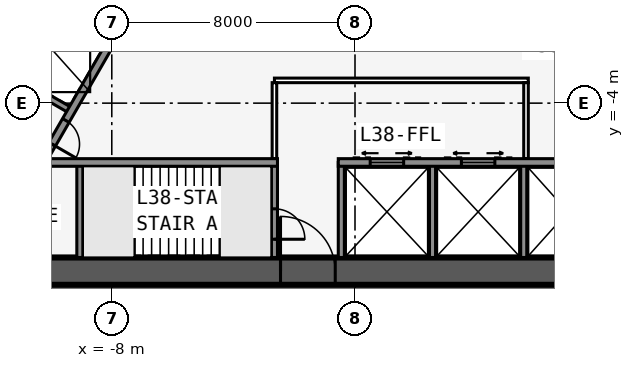
"""IFC4 building model, lengths in metres.
Left out: names, types, materials, properties, quantities, classifications, styles, units other than length and angle.
Written with IfcOpenShell. Run it as: python <this file> out.ifc"""

import sys

from ifc_helpers import new_model, si_unit, direction, frame, frame_2d, origin, place, context, subcontext, project, spatial, rectangle, extrude, element, fill, save


model = new_model("IFC4")
c1 = context("Model", 3, precision=1e-05, world=origin(), true_north=direction((0.0, 1.0)))
c2 = subcontext(c1, "Body", "Model", "MODEL_VIEW")
j1 = project(units=[si_unit("LENGTHUNIT", "METRE"), si_unit("PLANEANGLEUNIT", "RADIAN")], contexts=[c1])
p1 = place(None, origin())
s1 = spatial("IfcSite", under=j1, at=p1, CompositionType="ELEMENT")
p2 = place(p1, origin())
s2 = spatial("IfcBuilding", under=s1, at=p2, CompositionType="ELEMENT")
p3 = place(p2, frame((0.0, 0.0, 145.3)))
s3 = spatial("IfcBuildingStorey", under=s2, at=p3, CompositionType="ELEMENT", Elevation=145.3)
p4 = place(p3, frame((-16.5, -9.526, 0.0), z_axis=(0.0, 0.0, 1.0), x_axis=(1.0, 0.0, 0.0)))
e1 = element("IfcWall", 1, at=p4, inside=s3, PredefinedType="SHEAR", context=c2, shape_type="SweptSolid", body=[
    extrude(rectangle(XDim=33.0, YDim=0.9, at=frame_2d((16.5, 0.0))), origin(), (0.0, 0.0, 1.0), 3.4),
])
p5 = place(p4, frame((14.05, 0.0, 0.0)))
e2 = element("IfcOpeningElement", 2, at=p5, cuts=e1, PredefinedType="OPENING", context=c2, shape_type="SweptSolid", body=[
    extrude(rectangle(XDim=1.8, YDim=2.13, at=frame_2d((0.9, 1.065))), frame((0.0, 0.46, 0.0), z_axis=(0.0, -1.0, 0.0), x_axis=(1.0, 0.0, 0.0)), (0.0, 0.0, 1.0), 0.92),
])
p6 = place(p3, frame((-10.183, -5.951, 0.0), z_axis=(0.0, 0.0, 1.0), x_axis=(1.0, 0.0, 0.0)))
e3 = element("IfcWall", 3, at=p6, inside=s3, PredefinedType="SOLIDWALL", context=c2, shape_type="SweptSolid", body=[
    extrude(rectangle(XDim=7.633, YDim=0.25, at=frame_2d((3.816, 0.0))), origin(), (0.0, 0.0, 1.0), 3.235),
])
p7 = place(p3, frame((-0.55, -5.951, 0.0), z_axis=(0.0, 0.0, 1.0), x_axis=(1.0, 0.0, 0.0)))
e4 = element("IfcWall", 4, at=p7, inside=s3, PredefinedType="SOLIDWALL", context=c2, shape_type="SweptSolid", body=[
    extrude(rectangle(XDim=10.733, YDim=0.25, at=frame_2d((5.366, 0.0))), origin(), (0.0, 0.0, 1.0), 3.235),
])
p8 = place(p7, frame((9.314, 0.0, 0.0)))
e5 = element("IfcOpeningElement", 5, at=p8, cuts=e4, PredefinedType="OPENING", context=c2, shape_type="SweptSolid", body=[
    extrude(rectangle(XDim=0.9, YDim=2.13, at=frame_2d((0.45, 1.065))), frame((0.0, 0.135, 0.0), z_axis=(0.0, -1.0, 0.0), x_axis=(1.0, 0.0, 0.0)), (0.0, 0.0, 1.0), 0.27),
])
p9 = place(p7, frame((1.05, 0.0, 0.0)))
e6 = element("IfcOpeningElement", 6, at=p9, cuts=e4, PredefinedType="OPENING", context=c2, shape_type="SweptSolid", body=[
    extrude(rectangle(XDim=1.1, YDim=2.13, at=frame_2d((0.55, 1.065))), frame((0.0, 0.135, 0.0), z_axis=(0.0, -1.0, 0.0), x_axis=(1.0, 0.0, 0.0)), (0.0, 0.0, 1.0), 0.27),
])
p10 = place(p7, frame((4.05, 0.0, 0.0)))
e7 = element("IfcOpeningElement", 7, at=p10, cuts=e4, PredefinedType="OPENING", context=c2, shape_type="SweptSolid", body=[
    extrude(rectangle(XDim=1.1, YDim=2.13, at=frame_2d((0.55, 1.065))), frame((0.0, 0.135, 0.0), z_axis=(0.0, -1.0, 0.0), x_axis=(1.0, 0.0, 0.0)), (0.0, 0.0, 1.0), 0.27),
])
p11 = place(p3, frame((-9.05, -5.951, 0.0), z_axis=(0.0, 0.0, 1.0), x_axis=(0.0, -1.0, 0.0)))
e8 = element("IfcWall", 8, at=p11, inside=s3, PredefinedType="SOLIDWALL", context=c2, shape_type="SweptSolid", body=[
    extrude(rectangle(XDim=3.125, YDim=0.2, at=frame_2d((1.562, 0.0))), origin(), (0.0, 0.0, 1.0), 3.235),
])
p12 = place(p3, frame((-2.65, -5.951, 0.0), z_axis=(0.0, 0.0, 1.0), x_axis=(0.0, -1.0, 0.0)))
e9 = element("IfcWall", 9, at=p12, inside=s3, PredefinedType="SOLIDWALL", context=c2, shape_type="SweptSolid", body=[
    extrude(rectangle(XDim=3.125, YDim=0.2, at=frame_2d((1.562, 0.0))), origin(), (0.0, 0.0, 1.0), 3.235),
])
p13 = place(p12, frame((1.525, 0.0, 0.0)))
e10 = element("IfcOpeningElement", 10, at=p13, cuts=e9, PredefinedType="OPENING", context=c2, shape_type="SweptSolid", body=[
    extrude(rectangle(XDim=1.0, YDim=2.13, at=frame_2d((0.5, 1.065))), frame((0.0, 0.11, 0.0), z_axis=(0.0, -1.0, 0.0), x_axis=(1.0, 0.0, 0.0)), (0.0, 0.0, 1.0), 0.22),
])
for number, where, z_axis, x_axis in (
    (11, (-0.45, -5.951, 0.0), (0.0, 0.0, 1.0), (0.0, -1.0, 0.0)),
    (12, (2.55, -5.951, 0.0), (0.0, 0.0, 1.0), (0.0, -1.0, 0.0)),
    (13, (5.55, -5.951, 0.0), (0.0, 0.0, 1.0), (0.0, -1.0, 0.0)),
):
    element("IfcWall", number, at=place(p3, frame(where, z_axis=z_axis, x_axis=x_axis)), inside=s3, PredefinedType="SOLIDWALL", context=c2, shape_type="SweptSolid", body=[
        extrude(rectangle(XDim=3.125, YDim=0.2, at=frame_2d((1.562, 0.0))), origin(), (0.0, 0.0, 1.0), 3.235),
    ])
p14 = place(p3, frame((16.5, -9.526, 0.0), z_axis=(0.0, 0.0, 1.0), x_axis=(-0.499999749417, 0.866025548458, 0.0)))
e14 = element("IfcWall", 14, at=p14, inside=s3, PredefinedType="SHEAR", context=c2, shape_type="SweptSolid", body=[
    extrude(rectangle(XDim=33.0, YDim=0.9, at=frame_2d((16.5, 0.0))), origin(), (0.0, 0.0, 1.0), 3.4),
])
p15 = place(p14, frame((14.15, 0.0, 0.0)))
e15 = element("IfcOpeningElement", 15, at=p15, cuts=e14, PredefinedType="OPENING", context=c2, shape_type="SweptSolid", body=[
    extrude(rectangle(XDim=1.8, YDim=2.13, at=frame_2d((0.9, 1.065))), frame((0.0, 0.46, 0.0), z_axis=(0.0, -1.0, 0.0), x_axis=(1.0, 0.0, 0.0)), (0.0, 0.0, 1.0), 0.92),
])
p16 = place(p14, frame((12.6, 0.0, 0.0)))
e16 = element("IfcOpeningElement", 16, at=p16, cuts=e14, PredefinedType="OPENING", context=c2, shape_type="SweptSolid", body=[
    extrude(rectangle(XDim=1.0, YDim=2.13, at=frame_2d((0.5, 1.065))), frame((0.0, 0.46, 0.0), z_axis=(0.0, -1.0, 0.0), x_axis=(1.0, 0.0, 0.0)), (0.0, 0.0, 1.0), 0.92),
])
p17 = place(p3, frame((10.245, -5.843, 0.0), z_axis=(0.0, 0.0, 1.0), x_axis=(-0.499993009313, 0.866029439822, 0.0)))
e17 = element("IfcWall", 17, at=p17, inside=s3, PredefinedType="SOLIDWALL", context=c2, shape_type="SweptSolid", body=[
    extrude(rectangle(XDim=7.733, YDim=0.25, at=frame_2d((3.866, 0.0))), origin(), (0.0, 0.0, 1.0), 3.235),
])
p18 = place(p3, frame((0.0, 19.052, 0.0), z_axis=(0.0, 0.0, 1.0), x_axis=(-0.499999749417, -0.866025548458, 0.0)))
e18 = element("IfcWall", 18, at=p18, inside=s3, PredefinedType="SHEAR", context=c2, shape_type="SweptSolid", body=[
    extrude(rectangle(XDim=33.0, YDim=0.9, at=frame_2d((16.5, 0.0))), origin(), (0.0, 0.0, 1.0), 3.4),
])
p19 = place(p18, frame((14.15, 0.0, 0.0)))
e19 = element("IfcOpeningElement", 19, at=p19, cuts=e18, PredefinedType="OPENING", context=c2, shape_type="SweptSolid", body=[
    extrude(rectangle(XDim=1.8, YDim=2.13, at=frame_2d((0.9, 1.065))), frame((0.0, 0.46, 0.0), z_axis=(0.0, -1.0, 0.0), x_axis=(1.0, 0.0, 0.0)), (0.0, 0.0, 1.0), 0.92),
])
p20 = place(p18, frame((12.6, 0.0, 0.0)))
e20 = element("IfcOpeningElement", 20, at=p20, cuts=e18, PredefinedType="OPENING", context=c2, shape_type="SweptSolid", body=[
    extrude(rectangle(XDim=1.0, YDim=2.13, at=frame_2d((0.5, 1.065))), frame((0.0, 0.46, 0.0), z_axis=(0.0, -1.0, 0.0), x_axis=(1.0, 0.0, 0.0)), (0.0, 0.0, 1.0), 0.92),
])
p21 = place(p3, frame((-4.929, 3.365, 0.0), z_axis=(0.0, 0.0, 1.0), x_axis=(-0.499991433582, -0.866030349552, 0.0)))
e21 = element("IfcWall", 21, at=p21, inside=s3, PredefinedType="SOLIDWALL", context=c2, shape_type="SweptSolid", body=[
    extrude(rectangle(XDim=10.633, YDim=0.25, at=frame_2d((5.316, 0.0))), origin(), (0.0, 0.0, 1.0), 3.235),
])
p22 = place(p21, frame((9.164, 0.0, 0.0)))
e22 = element("IfcOpeningElement", 22, at=p22, cuts=e21, PredefinedType="OPENING", context=c2, shape_type="SweptSolid", body=[
    extrude(rectangle(XDim=0.9, YDim=2.13, at=frame_2d((0.45, 1.065))), frame((0.0, 0.135, 0.0), z_axis=(0.0, -1.0, 0.0), x_axis=(1.0, 0.0, 0.0)), (0.0, 0.0, 1.0), 0.27),
])
p23 = place(p3, frame((-9.329, -4.256, 0.0), z_axis=(0.0, 0.0, 1.0), x_axis=(-0.866022959057, 0.500004234368, 0.0)))
e23 = element("IfcWall", 23, at=p23, inside=s3, PredefinedType="SOLIDWALL", context=c2, shape_type="SweptSolid", body=[
    extrude(rectangle(XDim=3.125, YDim=0.2, at=frame_2d((1.562, 0.0))), origin(), (0.0, 0.0, 1.0), 3.235),
])
p24 = place(p3, frame((20.027, -10.985, 0.0), z_axis=(0.0, 0.0, 1.0), x_axis=(-0.500001677587, 0.866024435227, 0.0)))
e24 = element("IfcWall", 24, at=p24, inside=s3, PredefinedType="PARTITIONING", context=c2, shape_type="SweptSolid", body=[
    extrude(rectangle(XDim=39.054, YDim=0.15, at=frame_2d((19.527, 0.0))), origin(), (0.0, 0.0, 1.0), 3.235),
])
p25 = place(p24, frame((0.352, 0.0, 0.0)))
e25 = element("IfcOpeningElement", 25, at=p25, cuts=e24, PredefinedType="OPENING", context=c2, shape_type="SweptSolid", body=[
    extrude(rectangle(XDim=0.95, YDim=2.13, at=frame_2d((0.475, 1.065))), frame((0.0, 0.085, 0.0), z_axis=(0.0, -1.0, 0.0), x_axis=(1.0, 0.0, 0.0)), (0.0, 0.0, 1.0), 0.17),
])
p26 = place(p24, frame((6.552, 0.0, 0.0)))
e26 = element("IfcOpeningElement", 26, at=p26, cuts=e24, PredefinedType="OPENING", context=c2, shape_type="SweptSolid", body=[
    extrude(rectangle(XDim=0.95, YDim=2.13, at=frame_2d((0.475, 1.065))), frame((0.0, 0.085, 0.0), z_axis=(0.0, -1.0, 0.0), x_axis=(1.0, 0.0, 0.0)), (0.0, 0.0, 1.0), 0.17),
])
p27 = place(p24, frame((17.152, 0.0, 0.0)))
e27 = element("IfcOpeningElement", 27, at=p27, cuts=e24, PredefinedType="OPENING", context=c2, shape_type="SweptSolid", body=[
    extrude(rectangle(XDim=0.95, YDim=2.13, at=frame_2d((0.475, 1.065))), frame((0.0, 0.085, 0.0), z_axis=(0.0, -1.0, 0.0), x_axis=(1.0, 0.0, 0.0)), (0.0, 0.0, 1.0), 0.17),
])
p28 = place(p24, frame((21.552, 0.0, 0.0)))
e28 = element("IfcOpeningElement", 28, at=p28, cuts=e24, PredefinedType="OPENING", context=c2, shape_type="SweptSolid", body=[
    extrude(rectangle(XDim=0.95, YDim=2.13, at=frame_2d((0.475, 1.065))), frame((0.0, 0.085, 0.0), z_axis=(0.0, -1.0, 0.0), x_axis=(1.0, 0.0, 0.0)), (0.0, 0.0, 1.0), 0.17),
])
p29 = place(p24, frame((32.152, 0.0, 0.0)))
e29 = element("IfcOpeningElement", 29, at=p29, cuts=e24, PredefinedType="OPENING", context=c2, shape_type="SweptSolid", body=[
    extrude(rectangle(XDim=0.95, YDim=2.13, at=frame_2d((0.475, 1.065))), frame((0.0, 0.085, 0.0), z_axis=(0.0, -1.0, 0.0), x_axis=(1.0, 0.0, 0.0)), (0.0, 0.0, 1.0), 0.17),
])
p30 = place(p24, frame((37.752, 0.0, 0.0)))
e30 = element("IfcOpeningElement", 30, at=p30, cuts=e24, PredefinedType="OPENING", context=c2, shape_type="SweptSolid", body=[
    extrude(rectangle(XDim=0.95, YDim=2.13, at=frame_2d((0.475, 1.065))), frame((0.0, 0.085, 0.0), z_axis=(0.0, -1.0, 0.0), x_axis=(1.0, 0.0, 0.0)), (0.0, 0.0, 1.0), 0.17),
])
p31 = place(p3, frame((-0.5, 24.636, 0.0), z_axis=(0.0, 0.0, 1.0), x_axis=(-0.500001915564, -0.86602429783, 0.0)))
e31 = element("IfcWall", 31, at=p31, inside=s3, PredefinedType="PARTITIONING", context=c2, shape_type="SweptSolid", body=[
    extrude(rectangle(XDim=42.172, YDim=0.15, at=frame_2d((21.086, 0.0))), origin(), (0.0, 0.0, 1.0), 3.235),
])
p32 = place(p31, frame((1.911, 0.0, 0.0)))
e32 = element("IfcOpeningElement", 32, at=p32, cuts=e31, PredefinedType="OPENING", context=c2, shape_type="SweptSolid", body=[
    extrude(rectangle(XDim=0.95, YDim=2.13, at=frame_2d((0.475, 1.065))), frame((0.0, 0.085, 0.0), z_axis=(0.0, -1.0, 0.0), x_axis=(1.0, 0.0, 0.0)), (0.0, 0.0, 1.0), 0.17),
])
p33 = place(p31, frame((9.311, 0.0, 0.0)))
e33 = element("IfcOpeningElement", 33, at=p33, cuts=e31, PredefinedType="OPENING", context=c2, shape_type="SweptSolid", body=[
    extrude(rectangle(XDim=0.95, YDim=2.13, at=frame_2d((0.475, 1.065))), frame((0.0, 0.085, 0.0), z_axis=(0.0, -1.0, 0.0), x_axis=(1.0, 0.0, 0.0)), (0.0, 0.0, 1.0), 0.17),
])
p34 = place(p31, frame((18.111, 0.0, 0.0)))
e34 = element("IfcOpeningElement", 34, at=p34, cuts=e31, PredefinedType="OPENING", context=c2, shape_type="SweptSolid", body=[
    extrude(rectangle(XDim=0.95, YDim=2.13, at=frame_2d((0.475, 1.065))), frame((0.0, 0.085, 0.0), z_axis=(0.0, -1.0, 0.0), x_axis=(1.0, 0.0, 0.0)), (0.0, 0.0, 1.0), 0.17),
])
p35 = place(p31, frame((29.311, 0.0, 0.0)))
e35 = element("IfcOpeningElement", 35, at=p35, cuts=e31, PredefinedType="OPENING", context=c2, shape_type="SweptSolid", body=[
    extrude(rectangle(XDim=0.95, YDim=2.13, at=frame_2d((0.475, 1.065))), frame((0.0, 0.085, 0.0), z_axis=(0.0, -1.0, 0.0), x_axis=(1.0, 0.0, 0.0)), (0.0, 0.0, 1.0), 0.17),
])
p36 = place(p31, frame((39.311, 0.0, 0.0)))
e36 = element("IfcOpeningElement", 36, at=p36, cuts=e31, PredefinedType="OPENING", context=c2, shape_type="SweptSolid", body=[
    extrude(rectangle(XDim=0.95, YDim=2.13, at=frame_2d((0.475, 1.065))), frame((0.0, 0.085, 0.0), z_axis=(0.0, -1.0, 0.0), x_axis=(1.0, 0.0, 0.0)), (0.0, 0.0, 1.0), 0.17),
])
p37 = place(p3, frame((-2.65, -3.251, 0.0), z_axis=(0.0, 0.0, 1.0), x_axis=(1.0, 0.0, 0.0)))
e37 = element("IfcWall", 37, at=p37, inside=s3, PredefinedType="PARTITIONING", context=c2, shape_type="SweptSolid", body=[
    extrude(rectangle(XDim=8.35, YDim=0.15, at=frame_2d((4.175, 0.0))), origin(), (0.0, 0.0, 1.0), 3.235),
])
for number, where, z_axis, x_axis in (
    (38, (-2.65, -5.826, 0.0), (0.0, 0.0, 1.0), (0.0, 1.0, 0.0)),
    (39, (5.625, -5.826, 0.0), (0.0, 0.0, 1.0), (0.0, 1.0, 0.0)),
):
    element("IfcWall", number, at=place(p3, frame(where, z_axis=z_axis, x_axis=x_axis)), inside=s3, PredefinedType="PARTITIONING", context=c2, shape_type="SweptSolid", body=[
        extrude(rectangle(XDim=2.5, YDim=0.15, at=frame_2d((1.25, 0.0))), origin(), (0.0, 0.0, 1.0), 3.235),
    ])
p38 = place(p3, frame((-7.247, -7.576, 0.0), z_axis=(0.0, 0.0, 1.0), x_axis=(1.0, 0.0, 0.0)))
e40 = element("IfcWall", 40, at=p38, inside=s3, PredefinedType="SOLIDWALL", context=c2, shape_type="SweptSolid", body=[
    extrude(rectangle(XDim=2.794, YDim=0.1, at=frame_2d((1.397, 0.0))), origin(), (0.0, 0.0, 1.0), 3.4),
])
p39 = place(p5, origin())
e41 = element("IfcDoor", 41, at=p39, inside=s3, OperationType="DOUBLE_DOOR_SINGLE_SWING", PredefinedType="DOOR", context=c2, shape_type="SweptSolid", body=[
    extrude(rectangle(XDim=1.8, YDim=2.13, at=frame_2d((0.9, 1.065))), frame((0.0, 0.025, 0.0), z_axis=(0.0, -1.0, 0.0), x_axis=(1.0, 0.0, 0.0)), (0.0, 0.0, 1.0), 0.05),
])
fill(e2, e41)
p40 = place(p13, origin())
e42 = element("IfcDoor", 42, at=p40, inside=s3, OperationType="SINGLE_SWING_RIGHT", PredefinedType="DOOR", context=c2, shape_type="SweptSolid", body=[
    extrude(rectangle(XDim=1.0, YDim=2.13, at=frame_2d((0.5, 1.065))), frame((0.0, 0.025, 0.0), z_axis=(0.0, -1.0, 0.0), x_axis=(1.0, 0.0, 0.0)), (0.0, 0.0, 1.0), 0.05),
])
fill(e10, e42)
p41 = place(p22, origin())
e43 = element("IfcDoor", 43, at=p41, inside=s3, OperationType="SINGLE_SWING_RIGHT", PredefinedType="DOOR", context=c2, shape_type="SweptSolid", body=[
    extrude(rectangle(XDim=0.9, YDim=2.13, at=frame_2d((0.45, 1.065))), frame((0.0, 0.025, 0.0), z_axis=(0.0, -1.0, 0.0), x_axis=(1.0, 0.0, 0.0)), (0.0, 0.0, 1.0), 0.05),
])
fill(e22, e43)
p42 = place(p9, origin())
e44 = element("IfcDoor", 44, at=p42, inside=s3, OperationType="DOUBLE_DOOR_SLIDING", PredefinedType="USERDEFINED", context=c2, shape_type="SweptSolid", body=[
    extrude(rectangle(XDim=1.1, YDim=2.13, at=frame_2d((0.55, 1.065))), frame((0.0, 0.025, 0.0), z_axis=(0.0, -1.0, 0.0), x_axis=(1.0, 0.0, 0.0)), (0.0, 0.0, 1.0), 0.05),
])
fill(e6, e44)
p43 = place(p10, origin())
e45 = element("IfcDoor", 45, at=p43, inside=s3, OperationType="DOUBLE_DOOR_SLIDING", PredefinedType="USERDEFINED", context=c2, shape_type="SweptSolid", body=[
    extrude(rectangle(XDim=1.1, YDim=2.13, at=frame_2d((0.55, 1.065))), frame((0.0, 0.025, 0.0), z_axis=(0.0, -1.0, 0.0), x_axis=(1.0, 0.0, 0.0)), (0.0, 0.0, 1.0), 0.05),
])
fill(e7, e45)
save(model, sys.argv[1])
